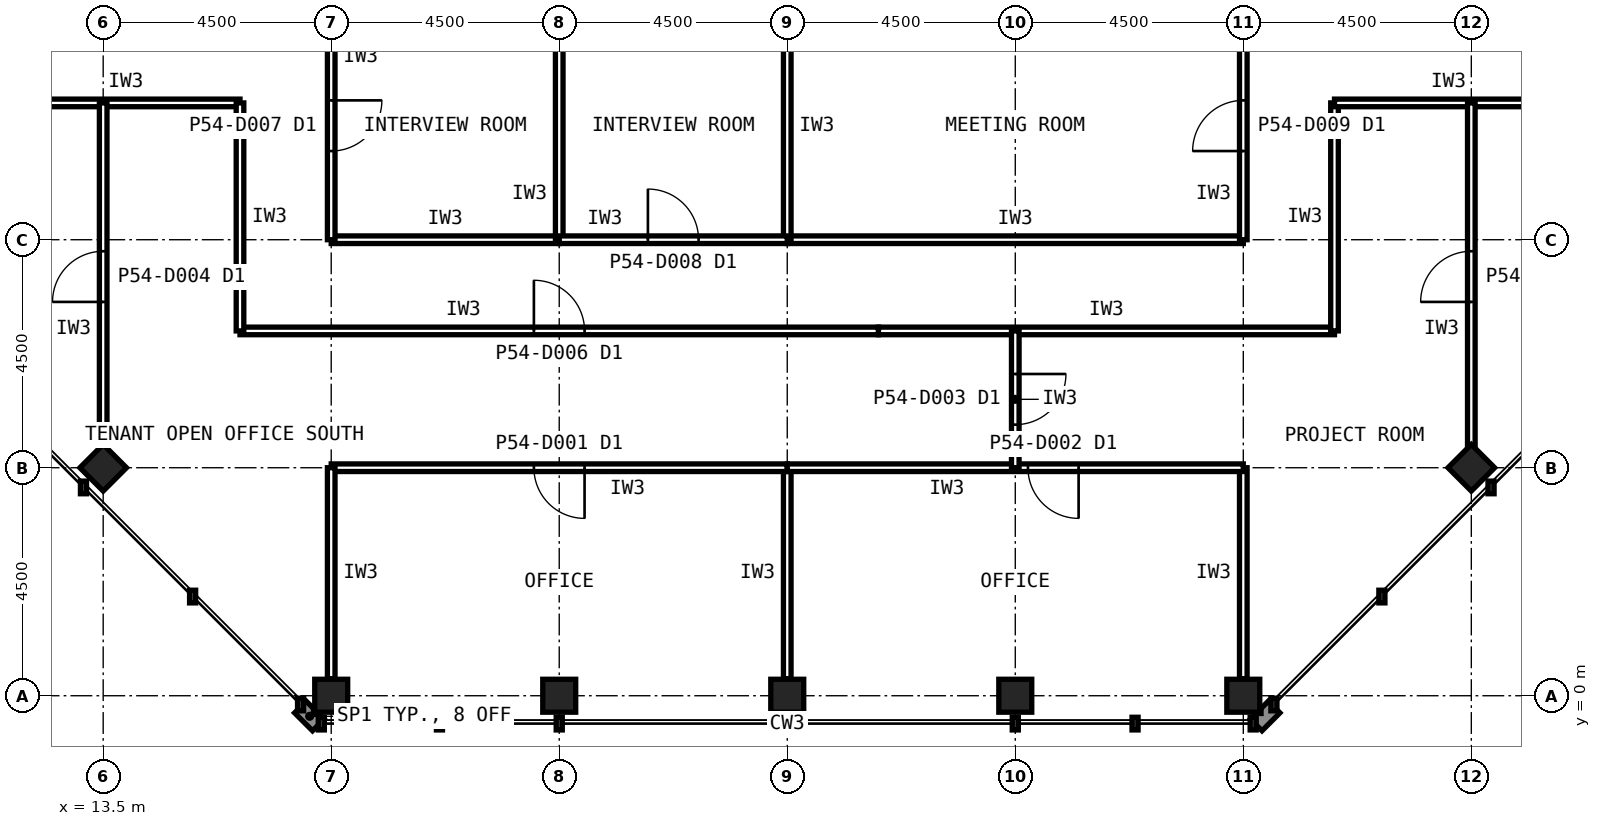
"""IFC4 building model, lengths in metres.
Left out: names, types, materials, properties, quantities, classifications, styles, units other than length and angle.
Written with IfcOpenShell. Run it as: python <this file> out.ifc"""

import sys

from ifc_helpers import new_model, si_unit, direction, frame, frame_2d, origin, origin_2d, place, context, subcontext, project, spatial, rectangle, hollow_rectangle, extrude, element, fill, save


model = new_model("IFC4")
c1 = context("Model", 3, precision=1e-05, world=origin(), true_north=direction((0.0, 1.0)))
c2 = subcontext(c1, "Body", "Model", "MODEL_VIEW")
j1 = project(units=[si_unit("LENGTHUNIT", "METRE"), si_unit("PLANEANGLEUNIT", "RADIAN")], contexts=[c1])
p1 = place(None, origin())
s1 = spatial("IfcSite", under=j1, at=p1, CompositionType="ELEMENT")
p2 = place(p1, origin())
s2 = spatial("IfcBuilding", under=s1, at=p2, CompositionType="ELEMENT")
p3 = place(p2, frame((0.0, 0.0, 230.6)))
s3 = spatial("IfcBuildingStorey", under=s2, at=p3, CompositionType="ELEMENT", Elevation=230.6)
for number, where, z_axis, x_axis in (
    (1, (18.0, 0.0, 0.0), (0.0, 0.0, 1.0), (1.0, 0.0, 0.0)),
    (2, (22.5, 0.0, 0.0), (0.0, 0.0, 1.0), (1.0, 0.0, 0.0)),
    (3, (27.0, 0.0, 0.0), (0.0, 0.0, 1.0), (1.0, 0.0, 0.0)),
    (4, (31.5, 0.0, 0.0), (0.0, 0.0, 1.0), (1.0, 0.0, 0.0)),
    (5, (36.0, 0.0, 0.0), (0.0, 0.0, 1.0), (1.0, 0.0, 0.0)),
    (6, (13.5, 4.5, 0.0), (0.0, 0.0, 1.0), (0.707, 0.707, 0.0)),
    (7, (40.5, 4.5, 0.0), (0.0, 0.0, 1.0), (0.707, 0.707, 0.0)),
):
    element("IfcColumn", number, at=place(p3, frame(where, z_axis=z_axis, x_axis=x_axis)), inside=s3, PredefinedType="COLUMN", context=c2, shape_type="SweptSolid", body=[
        extrude(hollow_rectangle(XDim=0.65, YDim=0.65, WallThickness=0.032, at=origin_2d()), origin(), (0.0, 0.0, 1.0), 4.0),
    ])
p4 = place(p3, frame((16.2, 7.2, 0.0), z_axis=(0.0, 0.0, 1.0), x_axis=(1.0, 0.0, 0.0)))
e8 = element("IfcWall", 8, at=p4, inside=s3, PredefinedType="PARTITIONING", context=c2, shape_type="SweptSolid", body=[
    extrude(rectangle(XDim=12.6, YDim=0.15, at=frame_2d((6.3, 0.0))), origin(), (0.0, 0.0, 1.0), 3.84),
])
p5 = place(p4, frame((5.8, 0.0, 0.0)))
e9 = element("IfcOpeningElement", 9, at=p5, cuts=e8, PredefinedType="OPENING", context=c2, shape_type="SweptSolid", body=[
    extrude(rectangle(XDim=1.0, YDim=2.1, at=frame_2d((0.5, 1.05))), frame((0.0, 0.085, 0.0), z_axis=(0.0, -1.0, 0.0), x_axis=(1.0, 0.0, 0.0)), (0.0, 0.0, 1.0), 0.17),
])
p6 = place(p3, frame((28.8, 7.2, 0.0), z_axis=(0.0, 0.0, 1.0), x_axis=(1.0, 0.0, 0.0)))
e10 = element("IfcWall", 10, at=p6, inside=s3, PredefinedType="PARTITIONING", context=c2, shape_type="SweptSolid", body=[
    extrude(rectangle(XDim=9.0, YDim=0.15, at=frame_2d((4.5, 0.0))), origin(), (0.0, 0.0, 1.0), 3.84),
])
for number, where, z_axis, x_axis in (
    (11, (11.7, 11.7, 0.0), (0.0, 0.0, 1.0), (1.0, 0.0, 0.0)),
    (12, (16.2, 11.7, 0.0), (0.0, 0.0, 1.0), (0.0, -1.0, 0.0)),
    (13, (37.8, 7.2, 0.0), (0.0, 0.0, 1.0), (0.0, 1.0, 0.0)),
    (14, (37.8, 11.7, 0.0), (0.0, 0.0, 1.0), (1.0, 0.0, 0.0)),
):
    element("IfcWall", number, at=place(p3, frame(where, z_axis=z_axis, x_axis=x_axis)), inside=s3, PredefinedType="PARTITIONING", context=c2, shape_type="SweptSolid", body=[
        extrude(rectangle(XDim=4.5, YDim=0.15, at=frame_2d((2.25, 0.0))), origin(), (0.0, 0.0, 1.0), 3.84),
    ])
p7 = place(p3, frame((27.0, 9.0, 0.0), z_axis=(0.0, 0.0, 1.0), x_axis=(1.0, 0.0, 0.0)))
e15 = element("IfcWall", 15, at=p7, inside=s3, PredefinedType="PARTITIONING", context=c2, shape_type="SweptSolid", body=[
    extrude(rectangle(XDim=9.0, YDim=0.15, at=frame_2d((4.5, 0.0))), origin(), (0.0, 0.0, 1.0), 3.84),
])
p8 = place(p3, frame((36.0, 9.0, 0.0), z_axis=(0.0, 0.0, 1.0), x_axis=(0.0, 1.0, 0.0)))
e16 = element("IfcWall", 16, at=p8, inside=s3, PredefinedType="PARTITIONING", context=c2, shape_type="SweptSolid", body=[
    extrude(rectangle(XDim=4.5, YDim=0.15, at=frame_2d((2.25, 0.0))), origin(), (0.0, 0.0, 1.0), 2.989),
])
p9 = place(p8, frame((1.75, 0.0, 0.0)))
e17 = element("IfcOpeningElement", 17, at=p9, cuts=e16, PredefinedType="OPENING", context=c2, shape_type="SweptSolid", body=[
    extrude(rectangle(XDim=1.0, YDim=2.1, at=frame_2d((0.5, 1.05))), frame((0.0, 0.085, 0.0), z_axis=(0.0, -1.0, 0.0), x_axis=(1.0, 0.0, 0.0)), (0.0, 0.0, 1.0), 0.17),
])
p10 = place(p3, frame((27.0, 13.5, 0.0), z_axis=(0.0, 0.0, 1.0), x_axis=(0.0, -1.0, 0.0)))
e18 = element("IfcWall", 18, at=p10, inside=s3, PredefinedType="PARTITIONING", context=c2, shape_type="SweptSolid", body=[
    extrude(rectangle(XDim=4.5, YDim=0.15, at=frame_2d((2.25, 0.0))), origin(), (0.0, 0.0, 1.0), 2.989),
])
p11 = place(p3, frame((27.0, 0.335, 0.0), z_axis=(0.0, 0.0, 1.0), x_axis=(0.0, 1.0, 0.0)))
e19 = element("IfcWall", 19, at=p11, inside=s3, PredefinedType="PARTITIONING", context=c2, shape_type="SweptSolid", body=[
    extrude(rectangle(XDim=4.165, YDim=0.15, at=frame_2d((2.083, 0.0))), origin(), (0.0, 0.0, 1.0), 2.989),
])
p12 = place(p3, frame((27.0, 4.5, 0.0), z_axis=(0.0, 0.0, 1.0), x_axis=(-1.0, 0.0, 0.0)))
e20 = element("IfcWall", 20, at=p12, inside=s3, PredefinedType="PARTITIONING", context=c2, shape_type="SweptSolid", body=[
    extrude(rectangle(XDim=9.0, YDim=0.15, at=frame_2d((4.5, 0.0))), origin(), (0.0, 0.0, 1.0), 3.84),
])
p13 = place(p12, frame((4.0, 0.0, 0.0)))
e21 = element("IfcOpeningElement", 21, at=p13, cuts=e20, PredefinedType="OPENING", context=c2, shape_type="SweptSolid", body=[
    extrude(rectangle(XDim=1.0, YDim=2.1, at=frame_2d((0.5, 1.05))), frame((0.0, 0.085, 0.0), z_axis=(0.0, -1.0, 0.0), x_axis=(1.0, 0.0, 0.0)), (0.0, 0.0, 1.0), 0.17),
])
for number, where, z_axis, x_axis in (
    (22, (18.0, 4.5, 0.0), (0.0, 0.0, 1.0), (0.0, -1.0, 0.0)),
    (23, (36.0, 0.335, 0.0), (0.0, 0.0, 1.0), (0.0, 1.0, 0.0)),
):
    element("IfcWall", number, at=place(p3, frame(where, z_axis=z_axis, x_axis=x_axis)), inside=s3, PredefinedType="PARTITIONING", context=c2, shape_type="SweptSolid", body=[
        extrude(rectangle(XDim=4.165, YDim=0.15, at=frame_2d((2.083, 0.0))), origin(), (0.0, 0.0, 1.0), 2.989),
    ])
p14 = place(p3, frame((36.0, 4.5, 0.0), z_axis=(0.0, 0.0, 1.0), x_axis=(-1.0, 0.0, 0.0)))
e24 = element("IfcWall", 24, at=p14, inside=s3, PredefinedType="PARTITIONING", context=c2, shape_type="SweptSolid", body=[
    extrude(rectangle(XDim=9.0, YDim=0.15, at=frame_2d((4.5, 0.0))), origin(), (0.0, 0.0, 1.0), 3.84),
])
p15 = place(p14, frame((3.25, 0.0, 0.0)))
e25 = element("IfcOpeningElement", 25, at=p15, cuts=e24, PredefinedType="OPENING", context=c2, shape_type="SweptSolid", body=[
    extrude(rectangle(XDim=1.0, YDim=2.1, at=frame_2d((0.5, 1.05))), frame((0.0, 0.085, 0.0), z_axis=(0.0, -1.0, 0.0), x_axis=(1.0, 0.0, 0.0)), (0.0, 0.0, 1.0), 0.17),
])
p16 = place(p3, frame((18.0, 9.0, 0.0), z_axis=(0.0, 0.0, 1.0), x_axis=(1.0, 0.0, 0.0)))
e26 = element("IfcWall", 26, at=p16, inside=s3, PredefinedType="PARTITIONING", context=c2, shape_type="SweptSolid", body=[
    extrude(rectangle(XDim=4.5, YDim=0.15, at=frame_2d((2.25, 0.0))), origin(), (0.0, 0.0, 1.0), 3.84),
])
p17 = place(p3, frame((22.5, 9.0, 0.0), z_axis=(0.0, 0.0, 1.0), x_axis=(0.0, 1.0, 0.0)))
e27 = element("IfcWall", 27, at=p17, inside=s3, PredefinedType="PARTITIONING", context=c2, shape_type="SweptSolid", body=[
    extrude(rectangle(XDim=4.5, YDim=0.15, at=frame_2d((2.25, 0.0))), origin(), (0.0, 0.0, 1.0), 2.989),
])
p18 = place(p3, frame((18.0, 13.5, 0.0), z_axis=(0.0, 0.0, 1.0), x_axis=(0.0, -1.0, 0.0)))
e28 = element("IfcWall", 28, at=p18, inside=s3, PredefinedType="PARTITIONING", context=c2, shape_type="SweptSolid", body=[
    extrude(rectangle(XDim=4.5, YDim=0.15, at=frame_2d((2.25, 0.0))), origin(), (0.0, 0.0, 1.0), 2.989),
])
p19 = place(p18, frame((1.75, 0.0, 0.0)))
e29 = element("IfcOpeningElement", 29, at=p19, cuts=e28, PredefinedType="OPENING", context=c2, shape_type="SweptSolid", body=[
    extrude(rectangle(XDim=1.0, YDim=2.1, at=frame_2d((0.5, 1.05))), frame((0.0, 0.085, 0.0), z_axis=(0.0, -1.0, 0.0), x_axis=(1.0, 0.0, 0.0)), (0.0, 0.0, 1.0), 0.17),
])
p20 = place(p3, frame((22.5, 9.0, 0.0), z_axis=(0.0, 0.0, 1.0), x_axis=(1.0, 0.0, 0.0)))
e30 = element("IfcWall", 30, at=p20, inside=s3, PredefinedType="PARTITIONING", context=c2, shape_type="SweptSolid", body=[
    extrude(rectangle(XDim=4.5, YDim=0.15, at=frame_2d((2.25, 0.0))), origin(), (0.0, 0.0, 1.0), 3.84),
])
p21 = place(p20, frame((1.75, 0.0, 0.0)))
e31 = element("IfcOpeningElement", 31, at=p21, cuts=e30, PredefinedType="OPENING", context=c2, shape_type="SweptSolid", body=[
    extrude(rectangle(XDim=1.0, YDim=2.1, at=frame_2d((0.5, 1.05))), frame((0.0, 0.085, 0.0), z_axis=(0.0, -1.0, 0.0), x_axis=(1.0, 0.0, 0.0)), (0.0, 0.0, 1.0), 0.17),
])
p22 = place(p3, frame((13.5, 4.845, 0.0), z_axis=(0.0, 0.0, 1.0), x_axis=(0.0, 1.0, 0.0)))
e32 = element("IfcWall", 32, at=p22, inside=s3, PredefinedType="PARTITIONING", context=c2, shape_type="SweptSolid", body=[
    extrude(rectangle(XDim=6.855, YDim=0.15, at=frame_2d((3.427, 0.0))), origin(), (0.0, 0.0, 1.0), 2.989),
])
p23 = place(p22, frame((2.927, 0.0, 0.0)))
e33 = element("IfcOpeningElement", 33, at=p23, cuts=e32, PredefinedType="OPENING", context=c2, shape_type="SweptSolid", body=[
    extrude(rectangle(XDim=1.0, YDim=2.1, at=frame_2d((0.5, 1.05))), frame((0.0, 0.085, 0.0), z_axis=(0.0, -1.0, 0.0), x_axis=(1.0, 0.0, 0.0)), (0.0, 0.0, 1.0), 0.17),
])
p24 = place(p3, frame((31.5, 7.2, 0.0), z_axis=(0.0, 0.0, 1.0), x_axis=(0.0, -1.0, 0.0)))
e34 = element("IfcWall", 34, at=p24, inside=s3, PredefinedType="PARTITIONING", context=c2, shape_type="SweptSolid", body=[
    extrude(rectangle(XDim=2.7, YDim=0.15, at=frame_2d((1.35, 0.0))), origin(), (0.0, 0.0, 1.0), 2.989),
])
p25 = place(p24, frame((0.85, 0.0, 0.0)))
e35 = element("IfcOpeningElement", 35, at=p25, cuts=e34, PredefinedType="OPENING", context=c2, shape_type="SweptSolid", body=[
    extrude(rectangle(XDim=1.0, YDim=2.1, at=frame_2d((0.5, 1.05))), frame((0.0, 0.085, 0.0), z_axis=(0.0, -1.0, 0.0), x_axis=(1.0, 0.0, 0.0)), (0.0, 0.0, 1.0), 0.17),
])
p26 = place(p3, frame((40.5, 4.845, 0.0), z_axis=(0.0, 0.0, 1.0), x_axis=(0.0, 1.0, 0.0)))
e36 = element("IfcWall", 36, at=p26, inside=s3, PredefinedType="PARTITIONING", context=c2, shape_type="SweptSolid", body=[
    extrude(rectangle(XDim=6.855, YDim=0.15, at=frame_2d((3.427, 0.0))), origin(), (0.0, 0.0, 1.0), 2.989),
])
p27 = place(p26, frame((2.927, 0.0, 0.0)))
e37 = element("IfcOpeningElement", 37, at=p27, cuts=e36, PredefinedType="OPENING", context=c2, shape_type="SweptSolid", body=[
    extrude(rectangle(XDim=1.0, YDim=2.1, at=frame_2d((0.5, 1.05))), frame((0.0, 0.085, 0.0), z_axis=(0.0, -1.0, 0.0), x_axis=(1.0, 0.0, 0.0)), (0.0, 0.0, 1.0), 0.17),
])
p28 = place(p5, origin())
e38 = element("IfcDoor", 38, at=p28, inside=s3, OperationType="SINGLE_SWING_LEFT", PredefinedType="DOOR", context=c2, shape_type="SweptSolid", body=[
    extrude(rectangle(XDim=1.0, YDim=2.1, at=frame_2d((0.5, 1.05))), frame((0.0, 0.025, 0.0), z_axis=(0.0, -1.0, 0.0), x_axis=(1.0, 0.0, 0.0)), (0.0, 0.0, 1.0), 0.05),
])
fill(e9, e38)
p29 = place(p9, origin())
e39 = element("IfcDoor", 39, at=p29, inside=s3, OperationType="SINGLE_SWING_LEFT", PredefinedType="DOOR", context=c2, shape_type="SweptSolid", body=[
    extrude(rectangle(XDim=1.0, YDim=2.1, at=frame_2d((0.5, 1.05))), frame((0.0, 0.025, 0.0), z_axis=(0.0, -1.0, 0.0), x_axis=(1.0, 0.0, 0.0)), (0.0, 0.0, 1.0), 0.05),
])
fill(e17, e39)
p30 = place(p13, origin())
e40 = element("IfcDoor", 40, at=p30, inside=s3, OperationType="SINGLE_SWING_LEFT", PredefinedType="DOOR", context=c2, shape_type="SweptSolid", body=[
    extrude(rectangle(XDim=1.0, YDim=2.1, at=frame_2d((0.5, 1.05))), frame((0.0, 0.025, 0.0), z_axis=(0.0, -1.0, 0.0), x_axis=(1.0, 0.0, 0.0)), (0.0, 0.0, 1.0), 0.05),
])
fill(e21, e40)
p31 = place(p15, origin())
e41 = element("IfcDoor", 41, at=p31, inside=s3, OperationType="SINGLE_SWING_LEFT", PredefinedType="DOOR", context=c2, shape_type="SweptSolid", body=[
    extrude(rectangle(XDim=1.0, YDim=2.1, at=frame_2d((0.5, 1.05))), frame((0.0, 0.025, 0.0), z_axis=(0.0, -1.0, 0.0), x_axis=(1.0, 0.0, 0.0)), (0.0, 0.0, 1.0), 0.05),
])
fill(e25, e41)
p32 = place(p19, origin())
e42 = element("IfcDoor", 42, at=p32, inside=s3, OperationType="SINGLE_SWING_LEFT", PredefinedType="DOOR", context=c2, shape_type="SweptSolid", body=[
    extrude(rectangle(XDim=1.0, YDim=2.1, at=frame_2d((0.5, 1.05))), frame((0.0, 0.025, 0.0), z_axis=(0.0, -1.0, 0.0), x_axis=(1.0, 0.0, 0.0)), (0.0, 0.0, 1.0), 0.05),
])
fill(e29, e42)
p33 = place(p21, origin())
e43 = element("IfcDoor", 43, at=p33, inside=s3, OperationType="SINGLE_SWING_LEFT", PredefinedType="DOOR", context=c2, shape_type="SweptSolid", body=[
    extrude(rectangle(XDim=1.0, YDim=2.1, at=frame_2d((0.5, 1.05))), frame((0.0, 0.025, 0.0), z_axis=(0.0, -1.0, 0.0), x_axis=(1.0, 0.0, 0.0)), (0.0, 0.0, 1.0), 0.05),
])
fill(e31, e43)
p34 = place(p23, origin())
e44 = element("IfcDoor", 44, at=p34, inside=s3, OperationType="SINGLE_SWING_LEFT", PredefinedType="DOOR", context=c2, shape_type="SweptSolid", body=[
    extrude(rectangle(XDim=1.0, YDim=2.1, at=frame_2d((0.5, 1.05))), frame((0.0, 0.025, 0.0), z_axis=(0.0, -1.0, 0.0), x_axis=(1.0, 0.0, 0.0)), (0.0, 0.0, 1.0), 0.05),
])
fill(e33, e44)
p35 = place(p25, origin())
e45 = element("IfcDoor", 45, at=p35, inside=s3, OperationType="SINGLE_SWING_LEFT", PredefinedType="DOOR", context=c2, shape_type="SweptSolid", body=[
    extrude(rectangle(XDim=1.0, YDim=2.1, at=frame_2d((0.5, 1.05))), frame((0.0, 0.025, 0.0), z_axis=(0.0, -1.0, 0.0), x_axis=(1.0, 0.0, 0.0)), (0.0, 0.0, 1.0), 0.05),
])
fill(e35, e45)
p36 = place(p27, origin())
e46 = element("IfcDoor", 46, at=p36, inside=s3, OperationType="SINGLE_SWING_LEFT", PredefinedType="DOOR", context=c2, shape_type="SweptSolid", body=[
    extrude(rectangle(XDim=1.0, YDim=2.1, at=frame_2d((0.5, 1.05))), frame((0.0, 0.025, 0.0), z_axis=(0.0, -1.0, 0.0), x_axis=(1.0, 0.0, 0.0)), (0.0, 0.0, 1.0), 0.05),
])
fill(e37, e46)
save(model, sys.argv[1])
